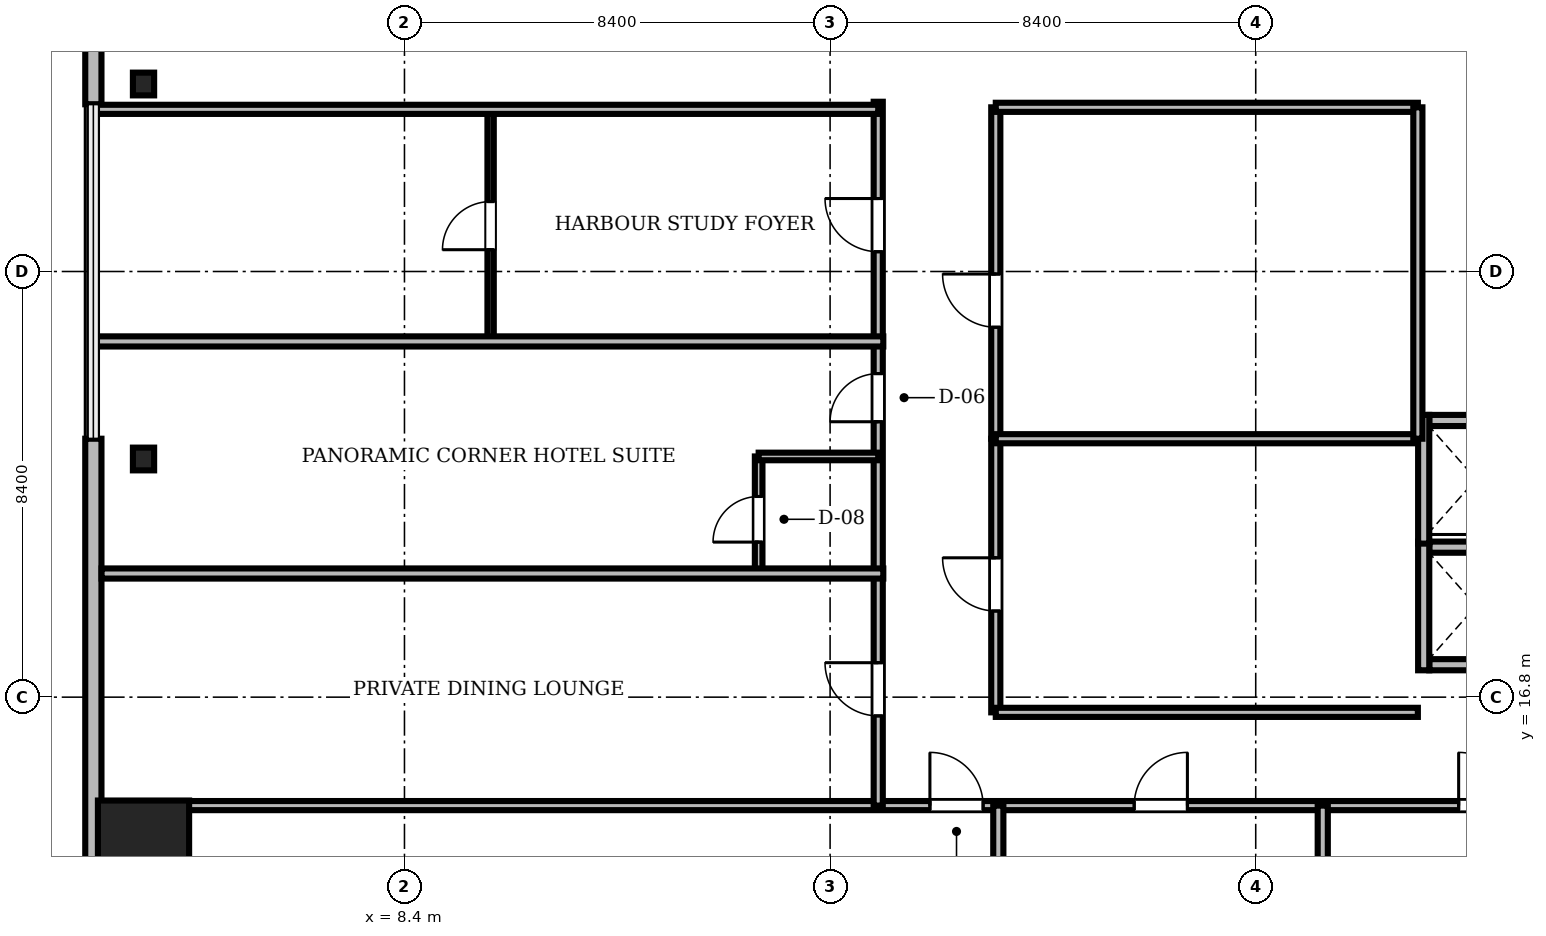
"""IFC4 building model, lengths in metres.
Left out: names, types, materials, properties, quantities, classifications, styles, units other than length and angle.
Written with IfcOpenShell. Run it as: python <this file> out.ifc"""

import sys

from ifc_helpers import new_model, si_unit, direction, frame, frame_2d, origin, origin_2d, place, context, subcontext, project, spatial, rectangle, i_section, extrude, source, transform, mapped, element, fill, save


model = new_model("IFC4")
c1 = context("Model", 3, precision=1e-05, world=origin(), true_north=direction((0.0, 1.0)))
c2 = subcontext(c1, "Body", "Model", "MODEL_VIEW")
j1 = project(units=[si_unit("LENGTHUNIT", "METRE"), si_unit("PLANEANGLEUNIT", "RADIAN")], contexts=[c1])
p1 = place(None, origin())
s1 = spatial("IfcSite", under=j1, at=p1, CompositionType="ELEMENT")
p2 = place(p1, origin())
s2 = spatial("IfcBuilding", under=s1, at=p2, CompositionType="ELEMENT")
p3 = place(p2, frame((0.0, 0.0, 31.25)))
s3 = spatial("IfcBuildingStorey", under=s2, at=p3, CompositionType="ELEMENT", Elevation=31.25)
m1 = source(origin(), c2, "Body", "SweptSolid", [
    extrude(rectangle(XDim=1.8, YDim=1.8, at=origin_2d()), origin(), (0.0, 0.0, 1.0), 3.41),
])
p4 = place(p3, frame((3.25, 13.86, 0.0), z_axis=(0.0, 0.0, 1.0), x_axis=(1.0, 0.0, 0.0)))
e1 = element("IfcColumn", 1, at=p4, inside=s3, PredefinedType="COLUMN", context=c2, shape_type="MappedRepresentation", body=[
    mapped(m1, transform((0.0, 0.0, 0.0), scale=1.0)),
])
m2 = source(origin(), c2, "Body", "SweptSolid", [
    extrude(i_section(OverallWidth=0.419, OverallDepth=0.449, WebThickness=0.031, FlangeThickness=0.048, FilletRadius=0.015, at=origin_2d()), origin(), (0.0, 0.0, 1.0), 3.41),
])
for number, where, z_axis, x_axis in (
    (2, (3.25, 28.9, 0.0), (0.0, 0.0, 1.0), (1.0, 0.0, 0.0)),
    (3, (3.25, 21.5, 0.0), (0.0, 0.0, 1.0), (1.0, 0.0, 0.0)),
):
    element("IfcColumn", number, at=place(p3, frame(where, z_axis=z_axis, x_axis=x_axis)), inside=s3, PredefinedType="COLUMN", context=c2, shape_type="MappedRepresentation", body=[
        mapped(m2, transform((0.0, 0.0, 0.0), scale=1.0)),
    ])
m3 = source(origin(), c2, "Body", "SweptSolid", [
    extrude(rectangle(XDim=15.6, YDim=0.32, at=frame_2d((7.8, 0.0))), origin(), (0.0, 0.0, 1.0), 3.41),
])
p5 = place(p3, frame((2.26, 44.1, 0.0), z_axis=(0.0, 0.0, 1.0), x_axis=(0.0, -1.0, 0.0)))
e4 = element("IfcWall", 4, at=p5, inside=s3, PredefinedType="SOLIDWALL", context=c2, shape_type="MappedRepresentation", body=[
    mapped(m3, transform((0.0, 0.0, 0.0), scale=1.0)),
])
m4 = source(origin(), c2, "Body", "SweptSolid", [
    extrude(rectangle(XDim=1.4, YDim=2.3, at=frame_2d((0.7, 1.15))), frame((0.0, 0.17, 0.0), z_axis=(0.0, -1.0, 0.0), x_axis=(1.0, 0.0, 0.0)), (0.0, 0.0, 1.0), 0.34),
])
p6 = place(p5, frame((9.61, 0.0, 0.0)))
e5 = element("IfcOpeningElement", 5, at=p6, cuts=e4, PredefinedType="OPENING", context=c2, shape_type="MappedRepresentation", body=[
    mapped(m4, transform((0.0, 0.0, 0.0), scale=1.0)),
])
m5 = source(origin(), c2, "Body", "SweptSolid", [
    extrude(rectangle(XDim=2.2, YDim=2.4, at=frame_2d((1.1, 1.2))), frame((0.0, 0.17, 0.0), z_axis=(0.0, -1.0, 0.0), x_axis=(1.0, 0.0, 0.0)), (0.0, 0.0, 1.0), 0.34),
])
p7 = place(p5, frame((3.005, 0.0, 0.72)))
e6 = element("IfcOpeningElement", 6, at=p7, cuts=e4, PredefinedType="OPENING", context=c2, shape_type="MappedRepresentation", body=[
    mapped(m5, transform((0.0, 0.0, 0.0), scale=1.0)),
])
m6 = source(origin(), c2, "Body", "SweptSolid", [
    extrude(rectangle(XDim=15.6, YDim=0.32, at=frame_2d((7.8, 0.0))), origin(), (0.0, 0.0, 1.0), 3.41),
])
p8 = place(p3, frame((2.26, 21.9, 0.0), z_axis=(0.0, 0.0, 1.0), x_axis=(0.0, -1.0, 0.0)))
e7 = element("IfcWall", 7, at=p8, inside=s3, PredefinedType="SOLIDWALL", context=c2, shape_type="MappedRepresentation", body=[
    mapped(m6, transform((0.0, 0.0, 0.0), scale=1.0)),
])
p9 = place(p8, frame((10.395, 0.0, 0.72)))
e8 = element("IfcOpeningElement", 8, at=p9, cuts=e7, PredefinedType="OPENING", context=c2, shape_type="MappedRepresentation", body=[
    mapped(m5, transform((0.0, 0.0, 0.0), scale=1.0)),
])
m7 = source(origin(), c2, "Body", "SweptSolid", [
    extrude(rectangle(XDim=1.85, YDim=0.22, at=frame_2d((0.925, 0.0))), origin(), (0.0, 0.0, 1.0), 3.41),
])
for number, where, z_axis, x_axis in (
    (9, (28.625, 17.44, 0.0), (0.0, 0.0, 1.0), (1.0, 0.0, 0.0)),
    (10, (28.625, 19.76, 0.0), (0.0, 0.0, 1.0), (1.0, 0.0, 0.0)),
):
    element("IfcWall", number, at=place(p3, frame(where, z_axis=z_axis, x_axis=x_axis)), inside=s3, PredefinedType="SOLIDWALL", context=c2, shape_type="MappedRepresentation", body=[
        mapped(m7, transform((0.0, 0.0, 0.0), scale=1.0)),
    ])
m8 = source(origin(), c2, "Body", "SweptSolid", [
    extrude(rectangle(XDim=2.54, YDim=0.22, at=frame_2d((1.27, 0.0))), origin(), (0.0, 0.0, 1.0), 3.41),
])
p10 = place(p3, frame((28.515, 17.33, 0.0), z_axis=(0.0, 0.0, 1.0), x_axis=(0.0, 1.0, 0.0)))
e11 = element("IfcWall", 11, at=p10, inside=s3, PredefinedType="SOLIDWALL", context=c2, shape_type="MappedRepresentation", body=[
    mapped(m8, transform((0.0, 0.0, 0.0), scale=1.0)),
])
p11 = place(p3, frame((28.625, 22.26, 0.0), z_axis=(0.0, 0.0, 1.0), x_axis=(1.0, 0.0, 0.0)))
e12 = element("IfcWall", 12, at=p11, inside=s3, PredefinedType="SOLIDWALL", context=c2, shape_type="MappedRepresentation", body=[
    mapped(m7, transform((0.0, 0.0, 0.0), scale=1.0)),
])
p12 = place(p3, frame((28.515, 19.83, 0.0), z_axis=(0.0, 0.0, 1.0), x_axis=(0.0, 1.0, 0.0)))
e13 = element("IfcWall", 13, at=p12, inside=s3, PredefinedType="SOLIDWALL", context=c2, shape_type="MappedRepresentation", body=[
    mapped(m8, transform((0.0, 0.0, 0.0), scale=1.0)),
])
m9 = source(origin(), c2, "Body", "SweptSolid", [
    extrude(rectangle(XDim=46.156, YDim=0.18, at=frame_2d((23.078, 0.0))), origin(), (0.0, 0.0, 1.0), 2.652),
])
p13 = place(p3, frame((2.422, 14.66, 0.0), z_axis=(0.0, 0.0, 1.0), x_axis=(1.0, 0.0, 0.0)))
e14 = element("IfcWall", 14, at=p13, inside=s3, PredefinedType="PARTITIONING", context=c2, shape_type="MappedRepresentation", body=[
    mapped(m9, transform((0.0, 0.0, 0.0), scale=1.0)),
])
m10 = source(origin(), c2, "Body", "SweptSolid", [
    extrude(rectangle(XDim=1.05, YDim=2.2, at=frame_2d((0.525, 1.1))), frame((0.0, 0.1, 0.0), z_axis=(0.0, -1.0, 0.0), x_axis=(1.0, 0.0, 0.0)), (0.0, 0.0, 1.0), 0.2),
])
p14 = place(p13, frame((16.348, 0.0, 0.0)))
e15 = element("IfcOpeningElement", 15, at=p14, cuts=e14, PredefinedType="OPENING", context=c2, shape_type="MappedRepresentation", body=[
    mapped(m10, transform((0.0, 0.0, 0.0), scale=1.0)),
])
p15 = place(p13, frame((20.38, 0.0, 0.0)))
e16 = element("IfcOpeningElement", 16, at=p15, cuts=e14, PredefinedType="OPENING", context=c2, shape_type="MappedRepresentation", body=[
    mapped(m10, transform((0.0, 0.0, 0.0), scale=1.0)),
])
p16 = place(p13, frame((26.783, 0.0, 0.0)))
e17 = element("IfcOpeningElement", 17, at=p16, cuts=e14, PredefinedType="OPENING", context=c2, shape_type="MappedRepresentation", body=[
    mapped(m10, transform((0.0, 0.0, 0.0), scale=1.0)),
])
p17 = place(p13, frame((33.186, 0.0, 0.0)))
e18 = element("IfcOpeningElement", 18, at=p17, cuts=e14, PredefinedType="OPENING", context=c2, shape_type="MappedRepresentation", body=[
    mapped(m10, transform((0.0, 0.0, 0.0), scale=1.0)),
])
p18 = place(p13, frame((40.998, 0.0, 0.0)))
e19 = element("IfcOpeningElement", 19, at=p18, cuts=e14, PredefinedType="OPENING", context=c2, shape_type="MappedRepresentation", body=[
    mapped(m10, transform((0.0, 0.0, 0.0), scale=1.0)),
])
m11 = source(origin(), c2, "Body", "SweptSolid", [
    extrude(rectangle(XDim=13.89, YDim=0.18, at=frame_2d((6.945, 0.0))), origin(), (0.0, 0.0, 1.0), 2.802),
])
p19 = place(p3, frame((17.75, 14.66, 0.0), z_axis=(0.0, 0.0, 1.0), x_axis=(0.0, 1.0, 0.0)))
e20 = element("IfcWall", 20, at=p19, inside=s3, PredefinedType="PARTITIONING", context=c2, shape_type="MappedRepresentation", body=[
    mapped(m11, transform((0.0, 0.0, 0.0), scale=1.0)),
])
p20 = place(p19, frame((1.77, 0.0, 0.0)))
e21 = element("IfcOpeningElement", 21, at=p20, cuts=e20, PredefinedType="OPENING", context=c2, shape_type="MappedRepresentation", body=[
    mapped(m10, transform((0.0, 0.0, 0.0), scale=1.0)),
])
m12 = source(origin(), c2, "Body", "SweptSolid", [
    extrude(rectangle(XDim=0.95, YDim=2.15, at=frame_2d((0.475, 1.075))), frame((0.0, 0.1, 0.0), z_axis=(0.0, -1.0, 0.0), x_axis=(1.0, 0.0, 0.0)), (0.0, 0.0, 1.0), 0.2),
])
p21 = place(p19, frame((7.575, 0.0, 0.0)))
e22 = element("IfcOpeningElement", 22, at=p21, cuts=e20, PredefinedType="OPENING", context=c2, shape_type="MappedRepresentation", body=[
    mapped(m12, transform((0.0, 0.0, 0.0), scale=1.0)),
])
p22 = place(p19, frame((10.93, 0.0, 0.0)))
e23 = element("IfcOpeningElement", 23, at=p22, cuts=e20, PredefinedType="OPENING", context=c2, shape_type="MappedRepresentation", body=[
    mapped(m10, transform((0.0, 0.0, 0.0), scale=1.0)),
])
m13 = source(origin(), c2, "Body", "SweptSolid", [
    extrude(rectangle(XDim=6.54, YDim=0.18, at=frame_2d((3.27, 0.0))), origin(), (0.0, 0.0, 1.0), 2.802),
])
p23 = place(p3, frame((20.07, 21.9, 0.0), z_axis=(0.0, 0.0, 1.0), x_axis=(0.0, 1.0, 0.0)))
e24 = element("IfcWall", 24, at=p23, inside=s3, PredefinedType="PARTITIONING", context=c2, shape_type="MappedRepresentation", body=[
    mapped(m13, transform((0.0, 0.0, 0.0), scale=1.0)),
])
p24 = place(p23, frame((2.2, 0.0, 0.0)))
e25 = element("IfcOpeningElement", 25, at=p24, cuts=e24, PredefinedType="OPENING", context=c2, shape_type="MappedRepresentation", body=[
    mapped(m10, transform((0.0, 0.0, 0.0), scale=1.0)),
])
m14 = source(origin(), c2, "Body", "SweptSolid", [
    extrude(rectangle(XDim=5.4, YDim=0.18, at=frame_2d((2.7, 0.0))), origin(), (0.0, 0.0, 1.0), 2.802),
])
p25 = place(p3, frame((20.07, 16.5, 0.0), z_axis=(0.0, 0.0, 1.0), x_axis=(0.0, 1.0, 0.0)))
e26 = element("IfcWall", 26, at=p25, inside=s3, PredefinedType="PARTITIONING", context=c2, shape_type="MappedRepresentation", body=[
    mapped(m14, transform((0.0, 0.0, 0.0), scale=1.0)),
])
p26 = place(p25, frame((2.0, 0.0, 0.0)))
e27 = element("IfcOpeningElement", 27, at=p26, cuts=e26, PredefinedType="OPENING", context=c2, shape_type="MappedRepresentation", body=[
    mapped(m10, transform((0.0, 0.0, 0.0), scale=1.0)),
])
m15 = source(origin(), c2, "Body", "SweptSolid", [
    extrude(rectangle(XDim=4.58, YDim=0.125, at=frame_2d((2.29, 0.0))), origin(), (0.0, 0.0, 1.0), 2.802),
])
p27 = place(p3, frame((10.1, 23.82, 0.0), z_axis=(0.0, 0.0, 1.0), x_axis=(0.0, 1.0, 0.0)))
e28 = element("IfcWall", 28, at=p27, inside=s3, PredefinedType="PARTITIONING", context=c2, shape_type="MappedRepresentation", body=[
    mapped(m15, transform((0.0, 0.0, 0.0), scale=1.0)),
])
m16 = source(origin(), c2, "Body", "SweptSolid", [
    extrude(rectangle(XDim=0.95, YDim=2.15, at=frame_2d((0.475, 1.075))), frame((0.0, 0.073, 0.0), z_axis=(0.0, -1.0, 0.0), x_axis=(1.0, 0.0, 0.0)), (0.0, 0.0, 1.0), 0.145),
])
p28 = place(p27, frame((1.81, 0.0, 0.0)))
e29 = element("IfcOpeningElement", 29, at=p28, cuts=e28, PredefinedType="OPENING", context=c2, shape_type="MappedRepresentation", body=[
    mapped(m16, transform((0.0, 0.0, 0.0), scale=1.0)),
])
m17 = source(origin(), c2, "Body", "SweptSolid", [
    extrude(rectangle(XDim=2.29, YDim=0.15, at=frame_2d((1.145, 0.0))), origin(), (0.0, 0.0, 1.0), 2.802),
])
p29 = place(p3, frame((15.39, 19.26, 0.0), z_axis=(0.0, 0.0, 1.0), x_axis=(0.0, 1.0, 0.0)))
e30 = element("IfcWall", 30, at=p29, inside=s3, PredefinedType="PARTITIONING", context=c2, shape_type="MappedRepresentation", body=[
    mapped(m17, transform((0.0, 0.0, 0.0), scale=1.0)),
])
m18 = source(origin(), c2, "Body", "SweptSolid", [
    extrude(rectangle(XDim=0.9, YDim=2.1, at=frame_2d((0.45, 1.05))), frame((0.0, 0.085, 0.0), z_axis=(0.0, -1.0, 0.0), x_axis=(1.0, 0.0, 0.0)), (0.0, 0.0, 1.0), 0.17),
])
p30 = place(p29, frame((0.6, 0.0, 0.0)))
e31 = element("IfcOpeningElement", 31, at=p30, cuts=e30, PredefinedType="OPENING", context=c2, shape_type="MappedRepresentation", body=[
    mapped(m18, transform((0.0, 0.0, 0.0), scale=1.0)),
])
m19 = source(origin(), c2, "Body", "SweptSolid", [
    extrude(rectangle(XDim=15.428, YDim=0.2, at=frame_2d((7.714, 0.0))), origin(), (0.0, 0.0, 1.0), 2.652),
])
p31 = place(p3, frame((2.422, 19.24, 0.0), z_axis=(0.0, 0.0, 1.0), x_axis=(1.0, 0.0, 0.0)))
e32 = element("IfcWall", 32, at=p31, inside=s3, PredefinedType="PARTITIONING", context=c2, shape_type="MappedRepresentation", body=[
    mapped(m19, transform((0.0, 0.0, 0.0), scale=1.0)),
])
m20 = source(origin(), c2, "Body", "SweptSolid", [
    extrude(rectangle(XDim=15.62, YDim=0.2, at=frame_2d((7.81, 0.0))), origin(), (0.0, 0.0, 1.0), 2.652),
])
p32 = place(p3, frame((2.23, 23.82, 0.0), z_axis=(0.0, 0.0, 1.0), x_axis=(1.0, 0.0, 0.0)))
e33 = element("IfcWall", 33, at=p32, inside=s3, PredefinedType="PARTITIONING", context=c2, shape_type="MappedRepresentation", body=[
    mapped(m20, transform((0.0, 0.0, 0.0), scale=1.0)),
])
m21 = source(origin(), c2, "Body", "SweptSolid", [
    extrude(rectangle(XDim=15.52, YDim=0.18, at=frame_2d((7.76, 0.0))), origin(), (0.0, 0.0, 1.0), 2.652),
])
p33 = place(p3, frame((2.23, 28.4, 0.0), z_axis=(0.0, 0.0, 1.0), x_axis=(1.0, 0.0, 0.0)))
e34 = element("IfcWall", 34, at=p33, inside=s3, PredefinedType="PARTITIONING", context=c2, shape_type="MappedRepresentation", body=[
    mapped(m21, transform((0.0, 0.0, 0.0), scale=1.0)),
])
m22 = source(origin(), c2, "Body", "SweptSolid", [
    extrude(rectangle(XDim=12.538, YDim=0.2, at=frame_2d((6.269, 0.0))), origin(), (0.0, 0.0, 1.0), 2.652),
])
p34 = place(p3, frame((20.12, 2.122, 0.0), z_axis=(0.0, 0.0, 1.0), x_axis=(0.0, 1.0, 0.0)))
e35 = element("IfcWall", 35, at=p34, inside=s3, PredefinedType="PARTITIONING", context=c2, shape_type="MappedRepresentation", body=[
    mapped(m22, transform((0.0, 0.0, 0.0), scale=1.0)),
])
m23 = source(origin(), c2, "Body", "SweptSolid", [
    extrude(rectangle(XDim=12.73, YDim=0.2, at=frame_2d((6.365, 0.0))), origin(), (0.0, 0.0, 1.0), 2.652),
])
p35 = place(p3, frame((26.523, 1.93, 0.0), z_axis=(0.0, 0.0, 1.0), x_axis=(0.0, 1.0, 0.0)))
e36 = element("IfcWall", 36, at=p35, inside=s3, PredefinedType="PARTITIONING", context=c2, shape_type="MappedRepresentation", body=[
    mapped(m23, transform((0.0, 0.0, 0.0), scale=1.0)),
])
m24 = source(origin(), c2, "Body", "SweptSolid", [
    extrude(rectangle(XDim=8.33, YDim=0.18, at=frame_2d((4.165, 0.0))), origin(), (0.0, 0.0, 1.0), 2.802),
])
p36 = place(p3, frame((20.07, 16.5, 0.0), z_axis=(0.0, 0.0, 1.0), x_axis=(1.0, 0.0, 0.0)))
e37 = element("IfcWall", 37, at=p36, inside=s3, PredefinedType="PARTITIONING", context=c2, shape_type="MappedRepresentation", body=[
    mapped(m24, transform((0.0, 0.0, 0.0), scale=1.0)),
])
m25 = source(origin(), c2, "Body", "SweptSolid", [
    extrude(rectangle(XDim=8.33, YDim=0.18, at=frame_2d((4.165, 0.0))), origin(), (0.0, 0.0, 1.0), 3.41),
])
for number, where, z_axis, x_axis in (
    (38, (20.07, 21.9, 0.0), (0.0, 0.0, 1.0), (1.0, 0.0, 0.0)),
    (39, (20.07, 28.44, 0.0), (0.0, 0.0, 1.0), (1.0, 0.0, 0.0)),
):
    element("IfcWall", number, at=place(p3, frame(where, z_axis=z_axis, x_axis=x_axis)), inside=s3, PredefinedType="PARTITIONING", context=c2, shape_type="MappedRepresentation", body=[
        mapped(m25, transform((0.0, 0.0, 0.0), scale=1.0)),
    ])
p37 = place(p3, frame((28.4, 21.9, 0.0), z_axis=(0.0, 0.0, 1.0), x_axis=(0.0, 1.0, 0.0)))
e40 = element("IfcWall", 40, at=p37, inside=s3, PredefinedType="PARTITIONING", context=c2, shape_type="MappedRepresentation", body=[
    mapped(m13, transform((0.0, 0.0, 0.0), scale=1.0)),
])
m26 = source(origin(), c2, "Body", "SweptSolid", [
    extrude(rectangle(XDim=2.36, YDim=0.15, at=frame_2d((1.18, 0.0))), origin(), (0.0, 0.0, 1.0), 3.41),
])
p38 = place(p3, frame((15.39, 21.55, 0.0), z_axis=(0.0, 0.0, 1.0), x_axis=(1.0, 0.0, 0.0)))
e41 = element("IfcWall", 41, at=p38, inside=s3, PredefinedType="PARTITIONING", context=c2, shape_type="MappedRepresentation", body=[
    mapped(m26, transform((0.0, 0.0, 0.0), scale=1.0)),
])
m27 = source(origin(), c2, "Body", "SweptSolid", [
    extrude(rectangle(XDim=1.05, YDim=2.2, at=frame_2d((0.525, 1.1))), frame((0.0, 0.025, 0.0), z_axis=(0.0, -1.0, 0.0), x_axis=(1.0, 0.0, 0.0)), (0.0, 0.0, 1.0), 0.05),
])
p39 = place(p14, origin())
e42 = element("IfcDoor", 42, at=p39, inside=s3, OperationType="SINGLE_SWING_LEFT", PredefinedType="DOOR", context=c2, shape_type="MappedRepresentation", body=[
    mapped(m27, transform((0.0, 0.0, 0.0), scale=1.0)),
])
fill(e15, e42)
p40 = place(p15, origin())
e43 = element("IfcDoor", 43, at=p40, inside=s3, OperationType="SINGLE_SWING_RIGHT", PredefinedType="DOOR", context=c2, shape_type="MappedRepresentation", body=[
    mapped(m27, transform((0.0, 0.0, 0.0), scale=1.0)),
])
fill(e16, e43)
p41 = place(p16, origin())
e44 = element("IfcDoor", 44, at=p41, inside=s3, OperationType="SINGLE_SWING_LEFT", PredefinedType="DOOR", context=c2, shape_type="MappedRepresentation", body=[
    mapped(m27, transform((0.0, 0.0, 0.0), scale=1.0)),
])
fill(e17, e44)
p42 = place(p20, origin())
e45 = element("IfcDoor", 45, at=p42, inside=s3, OperationType="SINGLE_SWING_RIGHT", PredefinedType="DOOR", context=c2, shape_type="MappedRepresentation", body=[
    mapped(m27, transform((0.0, 0.0, 0.0), scale=1.0)),
])
fill(e21, e45)
m28 = source(origin(), c2, "Body", "SweptSolid", [
    extrude(rectangle(XDim=0.95, YDim=2.15, at=frame_2d((0.475, 1.075))), frame((0.0, 0.025, 0.0), z_axis=(0.0, -1.0, 0.0), x_axis=(1.0, 0.0, 0.0)), (0.0, 0.0, 1.0), 0.05),
])
p43 = place(p21, origin())
e46 = element("IfcDoor", 46, at=p43, inside=s3, OperationType="SINGLE_SWING_LEFT", PredefinedType="DOOR", context=c2, shape_type="MappedRepresentation", body=[
    mapped(m28, transform((0.0, 0.0, 0.0), scale=1.0)),
])
fill(e22, e46)
p44 = place(p22, origin())
e47 = element("IfcDoor", 47, at=p44, inside=s3, OperationType="SINGLE_SWING_RIGHT", PredefinedType="DOOR", context=c2, shape_type="MappedRepresentation", body=[
    mapped(m27, transform((0.0, 0.0, 0.0), scale=1.0)),
])
fill(e23, e47)
p45 = place(p24, origin())
e48 = element("IfcDoor", 48, at=p45, inside=s3, OperationType="SINGLE_SWING_RIGHT", PredefinedType="DOOR", context=c2, shape_type="MappedRepresentation", body=[
    mapped(m27, transform((0.0, 0.0, 0.0), scale=1.0)),
])
fill(e25, e48)
p46 = place(p26, origin())
e49 = element("IfcDoor", 49, at=p46, inside=s3, OperationType="SINGLE_SWING_RIGHT", PredefinedType="DOOR", context=c2, shape_type="MappedRepresentation", body=[
    mapped(m27, transform((0.0, 0.0, 0.0), scale=1.0)),
])
fill(e27, e49)
p47 = place(p28, origin())
e50 = element("IfcDoor", 50, at=p47, inside=s3, OperationType="SINGLE_SWING_LEFT", PredefinedType="DOOR", context=c2, shape_type="MappedRepresentation", body=[
    mapped(m28, transform((0.0, 0.0, 0.0), scale=1.0)),
])
fill(e29, e50)
m29 = source(origin(), c2, "Body", "SweptSolid", [
    extrude(rectangle(XDim=0.9, YDim=2.1, at=frame_2d((0.45, 1.05))), frame((0.0, 0.025, 0.0), z_axis=(0.0, -1.0, 0.0), x_axis=(1.0, 0.0, 0.0)), (0.0, 0.0, 1.0), 0.05),
])
p48 = place(p30, origin())
e51 = element("IfcDoor", 51, at=p48, inside=s3, OperationType="SINGLE_SWING_LEFT", PredefinedType="DOOR", context=c2, shape_type="MappedRepresentation", body=[
    mapped(m29, transform((0.0, 0.0, 0.0), scale=1.0)),
])
fill(e31, e51)
save(model, sys.argv[1])
